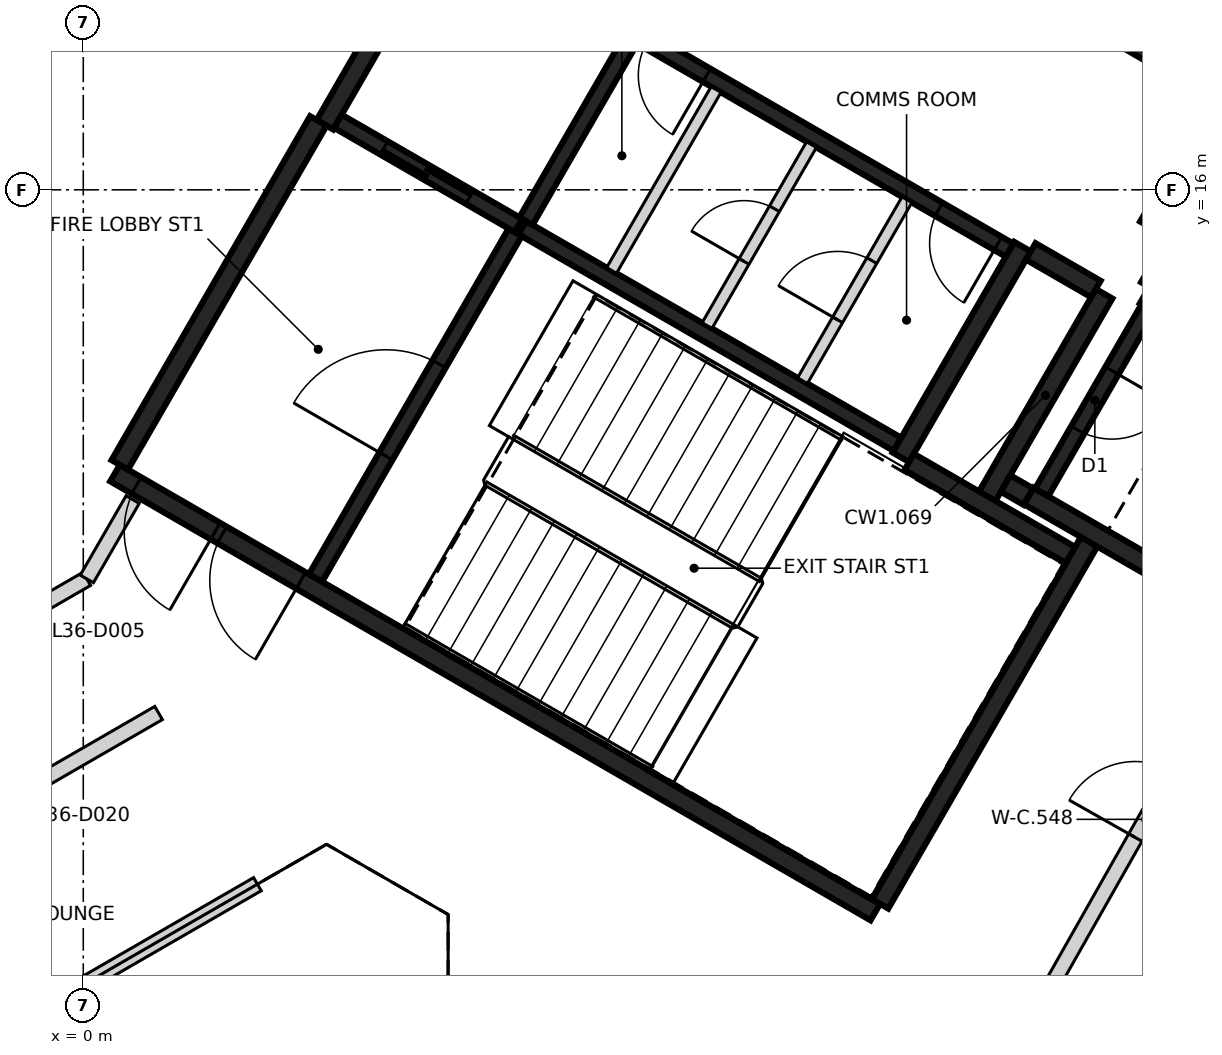
"""IFC4 building model, lengths in metres.
Left out: names, types, materials, properties, quantities, classifications, styles, units other than length and angle.
Written with IfcOpenShell. Run it as: python <this file> out.ifc"""

import sys

from ifc_helpers import new_model, si_unit, direction, frame, frame_2d, origin, place, context, subcontext, project, spatial, rectangle, extrude, element, fill, save


model = new_model("IFC4")
c1 = context("Model", 3, precision=1e-05, world=origin(), true_north=direction((0.0, 1.0)))
c2 = subcontext(c1, "Body", "Model", "MODEL_VIEW")
j1 = project(units=[si_unit("LENGTHUNIT", "METRE"), si_unit("PLANEANGLEUNIT", "RADIAN")], contexts=[c1])
p1 = place(None, origin())
s1 = spatial("IfcSite", under=j1, at=p1, CompositionType="ELEMENT")
p2 = place(p1, origin())
s2 = spatial("IfcBuilding", under=s1, at=p2, CompositionType="ELEMENT")
p3 = place(p2, frame((0.0, 0.0, 146.8)))
s3 = spatial("IfcBuildingStorey", under=s2, at=p3, CompositionType="ELEMENT", Elevation=146.8)
p4 = place(p3, frame((10.42, 6.498, 0.0), z_axis=(0.0, 0.0, 1.0), x_axis=(-0.866021906294, 0.500006057782, 0.0)))
e1 = element("IfcWall", 1, at=p4, inside=s3, PredefinedType="SHEAR", context=c2, shape_type="SweptSolid", body=[
    extrude(rectangle(XDim=11.55, YDim=0.25, at=frame_2d((5.775, 0.0))), origin(), (0.0, 0.0, 1.0), 3.2),
])
p5 = place(p4, frame((10.025, 0.0, 0.0)))
e2 = element("IfcOpeningElement", 2, at=p5, cuts=e1, PredefinedType="OPENING", context=c2, shape_type="SweptSolid", body=[
    extrude(rectangle(XDim=1.2, YDim=2.1, at=frame_2d((0.6, 1.05))), frame((0.0, 0.135, 0.0), z_axis=(0.0, -1.0, 0.0), x_axis=(1.0, 0.0, 0.0)), (0.0, 0.0, 1.0), 0.27),
])
p6 = place(p4, frame((8.725, 0.0, 0.0)))
e3 = element("IfcOpeningElement", 3, at=p6, cuts=e1, PredefinedType="OPENING", context=c2, shape_type="SweptSolid", body=[
    extrude(rectangle(XDim=1.2, YDim=2.1, at=frame_2d((0.6, 1.05))), frame((0.0, 0.135, 0.0), z_axis=(0.0, -1.0, 0.0), x_axis=(1.0, 0.0, 0.0)), (0.0, 0.0, 1.0), 0.27),
])
p7 = place(p3, frame((3.179, 16.856, 0.0), z_axis=(0.0, 0.0, 1.0), x_axis=(0.500004234368, 0.866022959057, 0.0)))
e4 = element("IfcWall", 4, at=p7, inside=s3, PredefinedType="SHEAR", context=c2, shape_type="SweptSolid", body=[
    extrude(rectangle(XDim=6.25, YDim=0.25, at=frame_2d((3.125, 0.0))), origin(), (0.0, 0.0, 1.0), 3.2),
])
p8 = place(p3, frame((0.48, 12.381, 0.0), z_axis=(0.0, 0.0, 1.0), x_axis=(0.49999885962, 0.866026062182, 0.0)))
e5 = element("IfcWall", 5, at=p8, inside=s3, PredefinedType="SHEAR", context=c2, shape_type="SweptSolid", body=[
    extrude(rectangle(XDim=5.225, YDim=0.25, at=frame_2d((2.612, 0.0))), origin(), (0.0, 0.0, 1.0), 3.2),
])
p9 = place(p3, frame((13.238, 11.378, 0.0), z_axis=(0.0, 0.0, 1.0), x_axis=(-0.500008851346, -0.866020293397, 0.0)))
e6 = element("IfcWall", 6, at=p9, inside=s3, PredefinedType="SHEAR", context=c2, shape_type="SweptSolid", body=[
    extrude(rectangle(XDim=5.51, YDim=0.25, at=frame_2d((2.755, 0.0))), origin(), (0.0, 0.0, 1.0), 3.2),
])
p10 = place(p3, frame((12.357, 15.252, 0.0), z_axis=(0.0, 0.0, 1.0), x_axis=(-0.500028443584, -0.866008981251, 0.0)))
e7 = element("IfcWall", 7, at=p10, inside=s3, PredefinedType="SHEAR", context=c2, shape_type="SweptSolid", body=[
    extrude(rectangle(XDim=3.2, YDim=0.25, at=frame_2d((1.6, 0.0))), origin(), (0.0, 0.0, 1.0), 3.2),
])
p11 = place(p3, frame((14.918, 10.54, 0.0), z_axis=(0.0, 0.0, 1.0), x_axis=(-0.866063538972, 0.499933942099, 0.0)))
e8 = element("IfcWall", 8, at=p11, inside=s3, PredefinedType="SHEAR", context=c2, shape_type="SweptSolid", body=[
    extrude(rectangle(XDim=2.865, YDim=0.25, at=frame_2d((1.432, 0.0))), origin(), (0.0, 0.0, 1.0), 3.2),
])
p12 = place(p3, frame((13.963, 14.614, 0.0), z_axis=(0.0, 0.0, 1.0), x_axis=(0.866042235819, -0.499970844928, 0.0)))
e9 = element("IfcWall", 9, at=p12, inside=s3, PredefinedType="SHEAR", context=c2, shape_type="SweptSolid", body=[
    extrude(rectangle(XDim=2.865, YDim=0.25, at=frame_2d((1.432, 0.0))), origin(), (0.0, 0.0, 1.0), 3.2),
])
p13 = place(p3, frame((11.888, 11.961, 0.0), z_axis=(0.0, 0.0, 1.0), x_axis=(0.500003324108, 0.866023484601, 0.0)))
e10 = element("IfcWall", 10, at=p13, inside=s3, PredefinedType="SHEAR", context=c2, shape_type="SweptSolid", body=[
    extrude(rectangle(XDim=3.085, YDim=0.25, at=frame_2d((1.542, 0.0))), origin(), (0.0, 0.0, 1.0), 3.2),
])
p14 = place(p3, frame((10.865, 12.418, 0.0), z_axis=(0.0, 0.0, 1.0), x_axis=(0.866026229868, -0.499998569178, 0.0)))
e11 = element("IfcWall", 11, at=p14, inside=s3, PredefinedType="SHEAR", context=c2, shape_type="SweptSolid", body=[
    extrude(rectangle(XDim=2.449, YDim=0.25, at=frame_2d((1.225, 0.0))), origin(), (0.0, 0.0, 1.0), 3.2),
])
p15 = place(p3, frame((13.297, 18.231, 0.0), z_axis=(0.0, 0.0, 1.0), x_axis=(0.866043531843, -0.499968599967, 0.0)))
e12 = element("IfcWall", 12, at=p15, inside=s3, PredefinedType="SHEAR", context=c2, shape_type="SweptSolid", body=[
    extrude(rectangle(XDim=1.975, YDim=0.25, at=frame_2d((0.987, 0.0))), origin(), (0.0, 0.0, 1.0), 3.2),
])
p16 = place(p3, frame((14.945, 17.135, 0.0), z_axis=(0.0, 0.0, 1.0), x_axis=(-0.499983108224, -0.866035156036, 0.0)))
e13 = element("IfcWall", 13, at=p16, inside=s3, PredefinedType="SHEAR", context=c2, shape_type="SweptSolid", body=[
    extrude(rectangle(XDim=1.865, YDim=0.25, at=frame_2d((0.932, 0.0))), origin(), (0.0, 0.0, 1.0), 3.2),
])
p17 = place(p16, frame((0.535, 0.0, 0.0)))
e14 = element("IfcOpeningElement", 14, at=p17, cuts=e13, PredefinedType="OPENING", context=c2, shape_type="SweptSolid", body=[
    extrude(rectangle(XDim=1.25, YDim=2.1, at=frame_2d((0.625, 1.05))), frame((0.0, 0.135, 0.0), z_axis=(0.0, -1.0, 0.0), x_axis=(1.0, 0.0, 0.0)), (0.0, 0.0, 1.0), 0.27),
])
p18 = place(p3, frame((13.322, 14.695, 0.0), z_axis=(0.0, 0.0, 1.0), x_axis=(-0.866017078145, 0.500014420154, 0.0)))
e15 = element("IfcWall", 15, at=p18, inside=s3, PredefinedType="SHEAR", context=c2, shape_type="SweptSolid", body=[
    extrude(rectangle(XDim=0.989, YDim=0.25, at=frame_2d((0.495, 0.0))), origin(), (0.0, 0.0, 1.0), 3.2),
])
p19 = place(p3, frame((14.368, 15.315, 0.0), z_axis=(0.0, 0.0, 1.0), x_axis=(-0.499897359611, -0.866084655132, 0.0)))
e16 = element("IfcWall", 16, at=p19, inside=s3, PredefinedType="SHEAR", context=c2, shape_type="SweptSolid", body=[
    extrude(rectangle(XDim=0.685, YDim=0.25, at=frame_2d((0.342, 0.0))), origin(), (0.0, 0.0, 1.0), 3.2),
])
p20 = place(p3, frame((12.433, 11.964, 0.0), z_axis=(0.0, 0.0, 1.0), x_axis=(-0.866055875208, 0.499947218231, 0.0)))
e17 = element("IfcWall", 17, at=p20, inside=s3, PredefinedType="SHEAR", context=c2, shape_type="SweptSolid", body=[
    extrude(rectangle(XDim=0.345, YDim=0.25, at=frame_2d((0.172, 0.0))), origin(), (0.0, 0.0, 1.0), 3.2),
])
p21 = place(p3, frame((5.775, 15.502, 0.0), z_axis=(0.0, 0.0, 1.0), x_axis=(0.866020080793, -0.500009219579, 0.0)))
e18 = element("IfcWall", 18, at=p21, inside=s3, PredefinedType="SHEAR", context=c2, shape_type="SweptSolid", body=[
    extrude(rectangle(XDim=5.699, YDim=0.2, at=frame_2d((2.85, 0.0))), origin(), (0.0, 0.0, 1.0), 3.2),
])
p22 = place(p3, frame((12.185, 15.207, 0.0), z_axis=(0.0, 0.0, 1.0), x_axis=(-0.866020080793, 0.500009219579, 0.0)))
e19 = element("IfcWall", 19, at=p22, inside=s3, PredefinedType="SHEAR", context=c2, shape_type="SweptSolid", body=[
    extrude(rectangle(XDim=5.699, YDim=0.2, at=frame_2d((2.85, 0.0))), origin(), (0.0, 0.0, 1.0), 3.2),
])
p23 = place(p22, frame((0.174, 0.0, 0.0)))
e20 = element("IfcOpeningElement", 20, at=p23, cuts=e19, PredefinedType="OPENING", context=c2, shape_type="SweptSolid", body=[
    extrude(rectangle(XDim=0.9, YDim=2.1, at=frame_2d((0.45, 1.05))), frame((0.0, 0.11, 0.0), z_axis=(0.0, -1.0, 0.0), x_axis=(1.0, 0.0, 0.0)), (0.0, 0.0, 1.0), 0.22),
])
p24 = place(p22, frame((4.599, 0.0, 0.0)))
e21 = element("IfcOpeningElement", 21, at=p24, cuts=e19, PredefinedType="OPENING", context=c2, shape_type="SweptSolid", body=[
    extrude(rectangle(XDim=0.9, YDim=2.1, at=frame_2d((0.45, 1.05))), frame((0.0, 0.11, 0.0), z_axis=(0.0, -1.0, 0.0), x_axis=(1.0, 0.0, 0.0)), (0.0, 0.0, 1.0), 0.22),
])
p25 = place(p3, frame((3.057, 10.895, 0.0), z_axis=(0.0, 0.0, 1.0), x_axis=(0.499989418164, 0.866031513124, 0.0)))
e22 = element("IfcWall", 22, at=p25, inside=s3, PredefinedType="SHEAR", context=c2, shape_type="SweptSolid", body=[
    extrude(rectangle(XDim=5.251, YDim=0.2, at=frame_2d((2.625, 0.0))), origin(), (0.0, 0.0, 1.0), 3.2),
])
p26 = place(p25, frame((1.849, 0.0, 0.0)))
e23 = element("IfcOpeningElement", 23, at=p26, cuts=e22, PredefinedType="OPENING", context=c2, shape_type="SweptSolid", body=[
    extrude(rectangle(XDim=1.4, YDim=2.1, at=frame_2d((0.7, 1.05))), frame((0.0, 0.11, 0.0), z_axis=(0.0, -1.0, 0.0), x_axis=(1.0, 0.0, 0.0)), (0.0, 0.0, 1.0), 0.22),
])
p27 = place(p3, frame((14.008, 14.442, 0.0), z_axis=(0.0, 0.0, 1.0), x_axis=(-0.499986818241, -0.866033014143, 0.0)))
e24 = element("IfcWall", 24, at=p27, inside=s3, PredefinedType="SHEAR", context=c2, shape_type="SweptSolid", body=[
    extrude(rectangle(XDim=2.798, YDim=0.2, at=frame_2d((1.399, 0.0))), origin(), (0.0, 0.0, 1.0), 3.2),
])
p28 = place(p27, frame((0.949, 0.0, 0.0)))
e25 = element("IfcOpeningElement", 25, at=p28, cuts=e24, PredefinedType="OPENING", context=c2, shape_type="SweptSolid", body=[
    extrude(rectangle(XDim=0.9, YDim=2.1, at=frame_2d((0.45, 1.05))), frame((0.0, 0.11, 0.0), z_axis=(0.0, -1.0, 0.0), x_axis=(1.0, 0.0, 0.0)), (0.0, 0.0, 1.0), 0.22),
])
p29 = place(p3, frame((7.199, 17.97, 0.0), z_axis=(0.0, 0.0, 1.0), x_axis=(-0.499968400327, -0.866043647095, 0.0)))
e26 = element("IfcWall", 26, at=p29, inside=s3, PredefinedType="SHEAR", context=c2, shape_type="SweptSolid", body=[
    extrude(rectangle(XDim=2.75, YDim=0.2, at=frame_2d((1.375, 0.0))), origin(), (0.0, 0.0, 1.0), 3.2),
])
p30 = place(p3, frame((5.725, 15.531, 0.0), z_axis=(0.0, 0.0, 1.0), x_axis=(-0.866037306777, 0.499979382845, 0.0)))
e27 = element("IfcWall", 27, at=p30, inside=s3, PredefinedType="SHEAR", context=c2, shape_type="SweptSolid", body=[
    extrude(rectangle(XDim=2.742, YDim=0.2, at=frame_2d((1.371, 0.0))), origin(), (0.0, 0.0, 1.0), 3.2),
])
p31 = place(p30, frame((0.743, 0.0, 0.0)))
e28 = element("IfcOpeningElement", 28, at=p31, cuts=e27, PredefinedType="OPENING", context=c2, shape_type="SweptSolid", body=[
    extrude(rectangle(XDim=1.3, YDim=2.1, at=frame_2d((0.65, 1.05))), frame((0.0, 0.11, 0.0), z_axis=(0.0, -1.0, 0.0), x_axis=(1.0, 0.0, 0.0)), (0.0, 0.0, 1.0), 0.22),
])
p32 = place(p3, frame((9.462, 13.489, 0.0), z_axis=(0.0, 0.0, 1.0), x_axis=(0.50002746344, 0.86600954718, 0.0)))
e29 = element("IfcWall", 29, at=p32, inside=s3, PredefinedType="PARTITIONING", context=c2, shape_type="SweptSolid", body=[
    extrude(rectangle(XDim=2.748, YDim=0.15, at=frame_2d((1.374, 0.0))), origin(), (0.0, 0.0, 1.0), 3.2),
])
p33 = place(p32, frame((0.924, 0.0, 0.0)))
e30 = element("IfcOpeningElement", 30, at=p33, cuts=e29, PredefinedType="OPENING", context=c2, shape_type="SweptSolid", body=[
    extrude(rectangle(XDim=0.9, YDim=2.1, at=frame_2d((0.45, 1.05))), frame((0.0, 0.085, 0.0), z_axis=(0.0, -1.0, 0.0), x_axis=(1.0, 0.0, 0.0)), (0.0, 0.0, 1.0), 0.17),
])
p34 = place(p3, frame((8.207, 14.214, 0.0), z_axis=(0.0, 0.0, 1.0), x_axis=(0.499922376475, 0.866070215109, 0.0)))
e31 = element("IfcWall", 31, at=p34, inside=s3, PredefinedType="PARTITIONING", context=c2, shape_type="SweptSolid", body=[
    extrude(rectangle(XDim=2.749, YDim=0.15, at=frame_2d((1.374, 0.0))), origin(), (0.0, 0.0, 1.0), 3.2),
])
p35 = place(p34, frame((0.974, 0.0, 0.0)))
e32 = element("IfcOpeningElement", 32, at=p35, cuts=e31, PredefinedType="OPENING", context=c2, shape_type="SweptSolid", body=[
    extrude(rectangle(XDim=0.8, YDim=2.1, at=frame_2d((0.4, 1.05))), frame((0.0, 0.085, 0.0), z_axis=(0.0, -1.0, 0.0), x_axis=(1.0, 0.0, 0.0)), (0.0, 0.0, 1.0), 0.17),
])
p36 = place(p3, frame((6.951, 14.939, 0.0), z_axis=(0.0, 0.0, 1.0), x_axis=(0.50002746344, 0.86600954718, 0.0)))
e33 = element("IfcWall", 33, at=p36, inside=s3, PredefinedType="PARTITIONING", context=c2, shape_type="SweptSolid", body=[
    extrude(rectangle(XDim=2.748, YDim=0.15, at=frame_2d((1.374, 0.0))), origin(), (0.0, 0.0, 1.0), 3.2),
])
p37 = place(p3, frame((-8.382, 3.705, 0.0), z_axis=(0.0, 0.0, 1.0), x_axis=(0.866012036978, 0.500023151273, 0.0)))
e34 = element("IfcWall", 34, at=p37, inside=s3, PredefinedType="PARTITIONING", context=c2, shape_type="SweptSolid", body=[
    extrude(rectangle(XDim=10.823, YDim=0.2, at=frame_2d((5.412, 0.0))), origin(), (0.0, 0.0, 1.0), 3.2),
])
p38 = place(p37, frame((7.661, 0.0, 0.0)))
e35 = element("IfcOpeningElement", 35, at=p38, cuts=e34, PredefinedType="OPENING", context=c2, shape_type="SweptSolid", body=[
    extrude(rectangle(XDim=0.9, YDim=2.1, at=frame_2d((0.45, 1.05))), frame((0.0, 0.11, 0.0), z_axis=(0.0, -1.0, 0.0), x_axis=(1.0, 0.0, 0.0)), (0.0, 0.0, 1.0), 0.22),
])
p39 = place(p37, frame((2.261, 0.0, 0.0)))
e36 = element("IfcOpeningElement", 36, at=p39, cuts=e34, PredefinedType="OPENING", context=c2, shape_type="SweptSolid", body=[
    extrude(rectangle(XDim=0.9, YDim=2.1, at=frame_2d((0.45, 1.05))), frame((0.0, 0.11, 0.0), z_axis=(0.0, -1.0, 0.0), x_axis=(1.0, 0.0, 0.0)), (0.0, 0.0, 1.0), 0.22),
])
p40 = place(p3, frame((-8.161, 6.142, 0.0), z_axis=(0.0, 0.0, 1.0), x_axis=(0.865927304867, 0.500169873828, 0.0)))
e37 = element("IfcWall", 37, at=p40, inside=s3, PredefinedType="PARTITIONING", context=c2, shape_type="SweptSolid", body=[
    extrude(rectangle(XDim=9.478, YDim=0.2, at=frame_2d((4.739, 0.0))), origin(), (0.0, 0.0, 1.0), 3.2),
])
p41 = place(p40, frame((4.851, 0.0, 0.0)))
e38 = element("IfcOpeningElement", 38, at=p41, cuts=e37, PredefinedType="OPENING", context=c2, shape_type="SweptSolid", body=[
    extrude(rectangle(XDim=1.0, YDim=2.1, at=frame_2d((0.5, 1.05))), frame((0.0, 0.11, 0.0), z_axis=(0.0, -1.0, 0.0), x_axis=(1.0, 0.0, 0.0)), (0.0, 0.0, 1.0), 0.22),
])
p42 = place(p40, frame((7.583, 0.0, 0.0)))
e39 = element("IfcOpeningElement", 39, at=p42, cuts=e37, PredefinedType="OPENING", context=c2, shape_type="SweptSolid", body=[
    extrude(rectangle(XDim=1.0, YDim=2.1, at=frame_2d((0.5, 1.05))), frame((0.0, 0.11, 0.0), z_axis=(0.0, -1.0, 0.0), x_axis=(1.0, 0.0, 0.0)), (0.0, 0.0, 1.0), 0.22),
])
p43 = place(p3, frame((0.047, 10.881, 0.0), z_axis=(0.0, 0.0, 1.0), x_axis=(0.500038011057, 0.866003456978, 0.0)))
e40 = element("IfcWall", 40, at=p43, inside=s3, PredefinedType="PARTITIONING", context=c2, shape_type="SweptSolid", body=[
    extrude(rectangle(XDim=1.206, YDim=0.2, at=frame_2d((0.603, 0.0))), origin(), (0.0, 0.0, 1.0), 3.2),
])
p44 = place(p3, frame((12.433, 4.992, 0.0), z_axis=(0.0, 0.0, 1.0), x_axis=(0.492740203499, 0.870176471675, 0.0)))
e41 = element("IfcWall", 41, at=p44, inside=s3, PredefinedType="PARTITIONING", context=c2, shape_type="SweptSolid", body=[
    extrude(rectangle(XDim=6.265, YDim=0.2, at=frame_2d((3.133, 0.0))), origin(), (0.0, 0.0, 1.0), 3.2),
])
p45 = place(p44, frame((2.858, 0.0, 0.0)))
e42 = element("IfcOpeningElement", 42, at=p45, cuts=e41, PredefinedType="OPENING", context=c2, shape_type="SweptSolid", body=[
    extrude(rectangle(XDim=1.0, YDim=2.1, at=frame_2d((0.5, 1.05))), frame((0.0, 0.11, 0.0), z_axis=(0.0, -1.0, 0.0), x_axis=(1.0, 0.0, 0.0)), (0.0, 0.0, 1.0), 0.22),
])
p46 = place(p3, frame((-7.082, 1.453, 0.0), z_axis=(0.0, 0.0, 1.0), x_axis=(0.866010525116, 0.500025769724, 0.0)))
e43 = element("IfcWall", 43, at=p46, inside=s3, PredefinedType="PARTITIONING", context=c2, shape_type="SweptSolid", body=[
    extrude(rectangle(XDim=10.823, YDim=0.2, at=frame_2d((5.411, 0.0))), origin(), (0.0, 0.0, 1.0), 2.3),
])
p47 = place(p31, origin())
e44 = element("IfcDoor", 44, at=p47, inside=s3, OperationType="SLIDING_TO_RIGHT", PredefinedType="DOOR", context=c2, shape_type="SweptSolid", body=[
    extrude(rectangle(XDim=1.3, YDim=2.1, at=frame_2d((0.65, 1.05))), frame((0.0, 0.025, 0.0), z_axis=(0.0, -1.0, 0.0), x_axis=(1.0, 0.0, 0.0)), (0.0, 0.0, 1.0), 0.05),
])
fill(e28, e44)
p48 = place(p5, origin())
e45 = element("IfcDoor", 45, at=p48, inside=s3, OperationType="SINGLE_SWING_LEFT", PredefinedType="DOOR", context=c2, shape_type="SweptSolid", body=[
    extrude(rectangle(XDim=1.2, YDim=2.1, at=frame_2d((0.6, 1.05))), frame((0.0, 0.025, 0.0), z_axis=(0.0, -1.0, 0.0), x_axis=(1.0, 0.0, 0.0)), (0.0, 0.0, 1.0), 0.05),
])
fill(e2, e45)
p49 = place(p6, origin())
e46 = element("IfcDoor", 46, at=p49, inside=s3, OperationType="SINGLE_SWING_RIGHT", PredefinedType="DOOR", context=c2, shape_type="SweptSolid", body=[
    extrude(rectangle(XDim=1.2, YDim=2.1, at=frame_2d((0.6, 1.05))), frame((0.0, 0.025, 0.0), z_axis=(0.0, -1.0, 0.0), x_axis=(1.0, 0.0, 0.0)), (0.0, 0.0, 1.0), 0.05),
])
fill(e3, e46)
p50 = place(p26, origin())
e47 = element("IfcDoor", 47, at=p50, inside=s3, OperationType="SINGLE_SWING_RIGHT", PredefinedType="DOOR", context=c2, shape_type="SweptSolid", body=[
    extrude(rectangle(XDim=1.4, YDim=2.1, at=frame_2d((0.7, 1.05))), frame((0.0, 0.025, 0.0), z_axis=(0.0, -1.0, 0.0), x_axis=(1.0, 0.0, 0.0)), (0.0, 0.0, 1.0), 0.05),
])
fill(e23, e47)
p51 = place(p23, origin())
e48 = element("IfcDoor", 48, at=p51, inside=s3, OperationType="SINGLE_SWING_LEFT", PredefinedType="DOOR", context=c2, shape_type="SweptSolid", body=[
    extrude(rectangle(XDim=0.9, YDim=2.1, at=frame_2d((0.45, 1.05))), frame((0.0, 0.025, 0.0), z_axis=(0.0, -1.0, 0.0), x_axis=(1.0, 0.0, 0.0)), (0.0, 0.0, 1.0), 0.05),
])
fill(e20, e48)
p52 = place(p33, origin())
e49 = element("IfcDoor", 49, at=p52, inside=s3, OperationType="SINGLE_SWING_RIGHT", PredefinedType="DOOR", context=c2, shape_type="SweptSolid", body=[
    extrude(rectangle(XDim=0.9, YDim=2.1, at=frame_2d((0.45, 1.05))), frame((0.0, 0.025, 0.0), z_axis=(0.0, -1.0, 0.0), x_axis=(1.0, 0.0, 0.0)), (0.0, 0.0, 1.0), 0.05),
])
fill(e30, e49)
p53 = place(p35, origin())
e50 = element("IfcDoor", 50, at=p53, inside=s3, OperationType="SINGLE_SWING_LEFT", PredefinedType="DOOR", context=c2, shape_type="SweptSolid", body=[
    extrude(rectangle(XDim=0.8, YDim=2.1, at=frame_2d((0.4, 1.05))), frame((0.0, 0.025, 0.0), z_axis=(0.0, -1.0, 0.0), x_axis=(1.0, 0.0, 0.0)), (0.0, 0.0, 1.0), 0.05),
])
fill(e32, e50)
p54 = place(p24, origin())
e51 = element("IfcDoor", 51, at=p54, inside=s3, OperationType="SINGLE_SWING_RIGHT", PredefinedType="DOOR", context=c2, shape_type="SweptSolid", body=[
    extrude(rectangle(XDim=0.9, YDim=2.1, at=frame_2d((0.45, 1.05))), frame((0.0, 0.025, 0.0), z_axis=(0.0, -1.0, 0.0), x_axis=(1.0, 0.0, 0.0)), (0.0, 0.0, 1.0), 0.05),
])
fill(e21, e51)
p55 = place(p28, origin())
e52 = element("IfcDoor", 52, at=p55, inside=s3, OperationType="SINGLE_SWING_LEFT", PredefinedType="DOOR", context=c2, shape_type="SweptSolid", body=[
    extrude(rectangle(XDim=0.9, YDim=2.1, at=frame_2d((0.45, 1.05))), frame((0.0, 0.025, 0.0), z_axis=(0.0, -1.0, 0.0), x_axis=(1.0, 0.0, 0.0)), (0.0, 0.0, 1.0), 0.05),
])
fill(e25, e52)
p56 = place(p45, frame((1.0, 0.0, 0.0), z_axis=(0.0, 0.0, 1.0), x_axis=(-1.0, 0.0, 0.0)))
e53 = element("IfcDoor", 53, at=p56, inside=s3, OperationType="SINGLE_SWING_LEFT", PredefinedType="DOOR", context=c2, shape_type="SweptSolid", body=[
    extrude(rectangle(XDim=1.0, YDim=2.1, at=frame_2d((0.5, 1.05))), frame((0.0, 0.025, 0.0), z_axis=(0.0, -1.0, 0.0), x_axis=(1.0, 0.0, 0.0)), (0.0, 0.0, 1.0), 0.05),
])
fill(e42, e53)
save(model, sys.argv[1])
